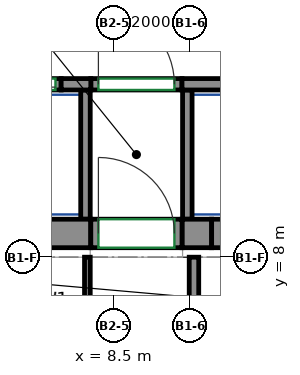
"""IFC4 building model, lengths in metres.
Left out: names, types, materials, properties, quantities, classifications, styles, units other than length and angle.
Written with IfcOpenShell. Run it as: python <this file> out.ifc"""

import sys

from ifc_helpers import new_model, si_unit, direction, frame, frame_2d, origin, place, context, subcontext, project, spatial, rectangle, extrude, source, transform, mapped, element, fill, save


model = new_model("IFC4")
c1 = context("Model", 3, precision=1e-05, world=origin(), true_north=direction((0.0, 1.0)))
c2 = subcontext(c1, "Body", "Model", "MODEL_VIEW")
j1 = project(units=[si_unit("LENGTHUNIT", "METRE"), si_unit("PLANEANGLEUNIT", "RADIAN")], contexts=[c1])
p1 = place(None, origin())
s1 = spatial("IfcSite", under=j1, at=p1, CompositionType="ELEMENT")
p2 = place(p1, origin())
s2 = spatial("IfcBuilding", under=s1, at=p2, CompositionType="ELEMENT")
p3 = place(p2, frame((0.0, 0.0, 192.3)))
s3 = spatial("IfcBuildingStorey", under=s2, at=p3, CompositionType="ELEMENT", Elevation=192.3)
m1 = source(origin(), c2, "Body", "SweptSolid", [
    extrude(rectangle(XDim=14.18, YDim=0.75, at=frame_2d((7.09, 0.0))), origin(), (0.0, 0.0, 1.0), 3.0),
])
p4 = place(p3, frame((-6.29, 8.625, 0.0), z_axis=(0.0, 0.0, 1.0), x_axis=(1.0, 0.0, 0.0)))
e1 = element("IfcWall", 1, at=p4, inside=s3, PredefinedType="SHEAR", context=c2, shape_type="MappedRepresentation", body=[
    mapped(m1, transform((0.0, 0.0, 0.0))),
])
m2 = source(origin(), c2, "Body", "SweptSolid", [
    extrude(rectangle(XDim=0.78, YDim=0.75, at=frame_2d((0.39, 0.0))), origin(), (0.0, 0.0, 1.0), 3.0),
])
p5 = place(p3, frame((10.29, 8.625, 0.0), z_axis=(0.0, 0.0, 1.0), x_axis=(1.0, 0.0, 0.0)))
e2 = element("IfcWall", 2, at=p5, inside=s3, PredefinedType="SHEAR", context=c2, shape_type="MappedRepresentation", body=[
    mapped(m2, transform((0.0, 0.0, 0.0))),
])
m3 = source(origin(), c2, "Body", "SweptSolid", [
    extrude(rectangle(XDim=0.78, YDim=0.3, at=frame_2d((0.39, 0.0))), origin(), (0.0, 0.0, 1.0), 3.0),
])
p6 = place(p3, frame((7.11, 12.55, 0.0), z_axis=(0.0, 0.0, 1.0), x_axis=(1.0, 0.0, 0.0)))
e3 = element("IfcWall", 3, at=p6, inside=s3, PredefinedType="SHEAR", context=c2, shape_type="MappedRepresentation", body=[
    mapped(m3, transform((0.0, 0.0, 0.0))),
])
m4 = source(origin(), c2, "Body", "SweptSolid", [
    extrude(rectangle(XDim=2.82, YDim=0.3, at=frame_2d((1.41, 0.0))), origin(), (0.0, 0.0, 1.0), 3.0),
])
p7 = place(p3, frame((10.29, 12.55, 0.0), z_axis=(0.0, 0.0, 1.0), x_axis=(1.0, 0.0, 0.0)))
e4 = element("IfcWall", 4, at=p7, inside=s3, PredefinedType="SHEAR", context=c2, shape_type="MappedRepresentation", body=[
    mapped(m4, transform((0.0, 0.0, 0.0))),
])
m5 = source(origin(), c2, "Body", "SweptSolid", [
    extrude(rectangle(XDim=1.4, YDim=0.3, at=frame_2d((0.7, 0.0))), origin(), (0.0, 0.0, 1.0), 3.0),
])
p8 = place(p3, frame((5.71, 12.55, 0.0), z_axis=(0.0, 0.0, 1.0), x_axis=(1.0, 0.0, 0.0)))
e5 = element("IfcWall", 5, at=p8, inside=s3, PredefinedType="PARTITIONING", context=c2, shape_type="MappedRepresentation", body=[
    mapped(m5, transform((0.0, 0.0, 0.0))),
])
p9 = place(p8, frame((0.15, 0.0, 0.0)))
e6 = element("IfcOpeningElement", 6, at=p9, cuts=e5, PredefinedType="OPENING", context=c2, shape_type="SweptSolid", body=[
    extrude(rectangle(XDim=1.1, YDim=2.1, at=frame_2d((0.55, 1.05))), frame((0.0, 0.16, 0.0), z_axis=(0.0, -1.0, 0.0), x_axis=(1.0, 0.0, 0.0)), (0.0, 0.0, 1.0), 0.32),
])
m6 = source(origin(), c2, "Body", "SweptSolid", [
    extrude(rectangle(XDim=2.4, YDim=0.3, at=frame_2d((1.2, 0.0))), origin(), (0.0, 0.0, 1.0), 3.0),
])
p10 = place(p3, frame((7.89, 12.55, 0.0), z_axis=(0.0, 0.0, 1.0), x_axis=(1.0, 0.0, 0.0)))
e7 = element("IfcWall", 7, at=p10, inside=s3, PredefinedType="PARTITIONING", context=c2, shape_type="MappedRepresentation", body=[
    mapped(m6, transform((0.0, 0.0, 0.0))),
])
p11 = place(p10, frame((0.2, 0.0, 0.0)))
e8 = element("IfcOpeningElement", 8, at=p11, cuts=e7, PredefinedType="OPENING", context=c2, shape_type="SweptSolid", body=[
    extrude(rectangle(XDim=2.0, YDim=2.1, at=frame_2d((1.0, 1.05))), frame((0.0, 0.16, 0.0), z_axis=(0.0, -1.0, 0.0), x_axis=(1.0, 0.0, 0.0)), (0.0, 0.0, 1.0), 0.32),
])
m7 = source(origin(), c2, "Body", "SweptSolid", [
    extrude(rectangle(XDim=2.65, YDim=0.25, at=frame_2d((1.325, 0.0))), origin(), (0.0, 0.0, 1.0), 3.0),
])
p12 = place(p3, frame((10.605, 5.35, 0.0), z_axis=(0.0, 0.0, 1.0), x_axis=(0.0, 1.0, 0.0)))
e9 = element("IfcWall", 9, at=p12, inside=s3, PredefinedType="PARTITIONING", context=c2, shape_type="MappedRepresentation", body=[
    mapped(m7, transform((0.0, 0.0, 0.0))),
])
m8 = source(origin(), c2, "Body", "SweptSolid", [
    extrude(rectangle(XDim=3.4, YDim=0.25, at=frame_2d((1.7, 0.0))), origin(), (0.0, 0.0, 1.0), 3.0),
])
for number, where, z_axis, x_axis in (
    (10, (10.43, 9.0, 0.0), (0.0, 0.0, 1.0), (0.0, 1.0, 0.0)),
    (11, (7.75, 9.0, 0.0), (0.0, 0.0, 1.0), (0.0, 1.0, 0.0)),
):
    element("IfcWall", number, at=place(p3, frame(where, z_axis=z_axis, x_axis=x_axis)), inside=s3, PredefinedType="PARTITIONING", context=c2, shape_type="MappedRepresentation", body=[
        mapped(m8, transform((0.0, 0.0, 0.0))),
    ])
m9 = source(origin(), c2, "Body", "SweptSolid", [
    extrude(rectangle(XDim=2.4, YDim=0.75, at=frame_2d((1.2, 0.0))), origin(), (0.0, 0.0, 1.0), 2.7),
])
p13 = place(p3, frame((7.89, 8.625, 0.0), z_axis=(0.0, 0.0, 1.0), x_axis=(1.0, 0.0, 0.0)))
e12 = element("IfcWall", 12, at=p13, inside=s3, PredefinedType="PARTITIONING", context=c2, shape_type="MappedRepresentation", body=[
    mapped(m9, transform((0.0, 0.0, 0.0))),
])
p14 = place(p13, frame((0.2, 0.0, 0.0)))
e13 = element("IfcOpeningElement", 13, at=p14, cuts=e12, PredefinedType="OPENING", context=c2, shape_type="SweptSolid", body=[
    extrude(rectangle(XDim=2.0, YDim=2.1, at=frame_2d((1.0, 1.05))), frame((0.0, 0.385, 0.0), z_axis=(0.0, -1.0, 0.0), x_axis=(1.0, 0.0, 0.0)), (0.0, 0.0, 1.0), 0.77),
])
m10 = source(origin(), c2, "Body", "SweptSolid", [
    extrude(rectangle(XDim=1.4, YDim=0.75, at=frame_2d((0.7, 0.0))), origin(), (0.0, 0.0, 1.0), 2.7),
])
p15 = place(p3, frame((11.07, 8.625, 0.0), z_axis=(0.0, 0.0, 1.0), x_axis=(1.0, 0.0, 0.0)))
e14 = element("IfcWall", 14, at=p15, inside=s3, PredefinedType="PARTITIONING", context=c2, shape_type="MappedRepresentation", body=[
    mapped(m10, transform((0.0, 0.0, 0.0))),
])
p16 = place(p15, frame((0.25, 0.0, 0.0)))
e15 = element("IfcOpeningElement", 15, at=p16, cuts=e14, PredefinedType="OPENING", context=c2, shape_type="SweptSolid", body=[
    extrude(rectangle(XDim=0.9, YDim=2.1, at=frame_2d((0.45, 1.05))), frame((0.0, 0.385, 0.0), z_axis=(0.0, -1.0, 0.0), x_axis=(1.0, 0.0, 0.0)), (0.0, 0.0, 1.0), 0.77),
])
p17 = place(p3, frame((7.8, 8.0, 0.0), z_axis=(0.0, 0.0, 1.0), x_axis=(0.0, -1.0, 0.0)))
e16 = element("IfcWall", 16, at=p17, inside=s3, PredefinedType="PARTITIONING", context=c2, shape_type="SweptSolid", body=[
    extrude(rectangle(XDim=2.325, YDim=0.15, at=frame_2d((1.163, 0.0))), origin(), (0.0, 0.0, 1.0), 3.0),
])
p18 = place(p11, origin())
e17 = element("IfcDoor", 17, at=p18, inside=s3, OperationType="DOUBLE_DOOR_SINGLE_SWING", PredefinedType="DOOR", context=c2, shape_type="SweptSolid", body=[
    extrude(rectangle(XDim=2.0, YDim=2.1, at=frame_2d((1.0, 1.05))), frame((0.0, 0.025, 0.0), z_axis=(0.0, -1.0, 0.0), x_axis=(1.0, 0.0, 0.0)), (0.0, 0.0, 1.0), 0.05),
])
fill(e8, e17)
p19 = place(p14, origin())
e18 = element("IfcDoor", 18, at=p19, inside=s3, OperationType="DOUBLE_DOOR_SINGLE_SWING", PredefinedType="DOOR", context=c2, shape_type="SweptSolid", body=[
    extrude(rectangle(XDim=2.0, YDim=2.1, at=frame_2d((1.0, 1.05))), frame((0.0, 0.28, 0.0), z_axis=(0.0, -1.0, 0.0), x_axis=(1.0, 0.0, 0.0)), (0.0, 0.0, 1.0), 0.05),
])
fill(e13, e18)
p20 = place(p9, origin())
e19 = element("IfcDoor", 19, at=p20, inside=s3, OperationType="DOUBLE_DOOR_SLIDING", PredefinedType="DOOR", context=c2, shape_type="SweptSolid", body=[
    extrude(rectangle(XDim=1.1, YDim=2.1, at=frame_2d((0.55, 1.05))), frame((0.0, 0.025, 0.0), z_axis=(0.0, -1.0, 0.0), x_axis=(1.0, 0.0, 0.0)), (0.0, 0.0, 1.0), 0.05),
])
fill(e6, e19)
save(model, sys.argv[1])
